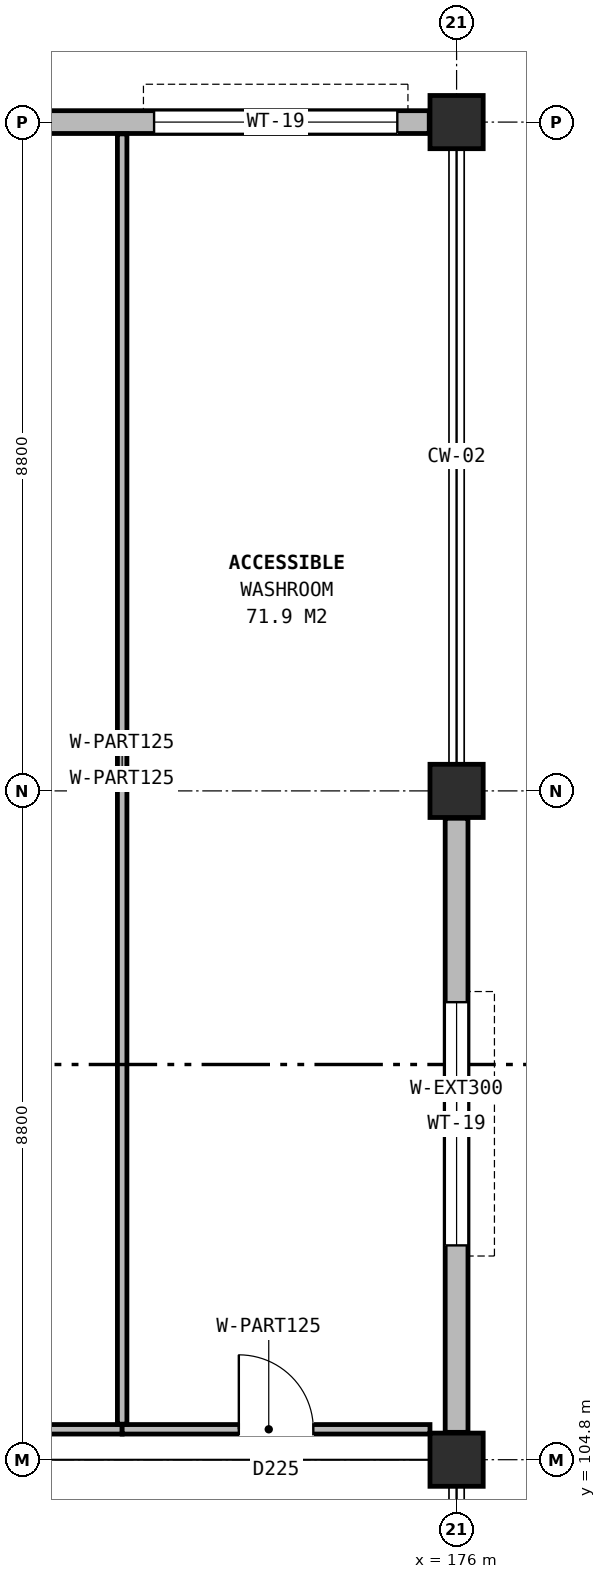
"""IFC4 building model, lengths in metres.
Left out: names, types, materials, properties, quantities, classifications, styles, units other than length and angle.
Written with IfcOpenShell. Run it as: python <this file> out.ifc"""

import sys

from ifc_helpers import new_model, si_unit, direction, frame, frame_2d, origin, origin_2d, place, context, subcontext, project, spatial, rectangle, extrude, element, fill, save


model = new_model("IFC4")
c1 = context("Model", 3, precision=1e-05, world=origin(), true_north=direction((0.0, 1.0)))
c2 = subcontext(c1, "Body", "Model", "MODEL_VIEW")
j1 = project(units=[si_unit("LENGTHUNIT", "METRE"), si_unit("PLANEANGLEUNIT", "RADIAN")], contexts=[c1])
p1 = place(None, origin())
s1 = spatial("IfcSite", under=j1, at=p1, CompositionType="ELEMENT")
p2 = place(p1, origin())
s2 = spatial("IfcBuilding", under=s1, at=p2, CompositionType="ELEMENT")
p3 = place(p2, frame((0.0, 0.0, 28.8)))
s3 = spatial("IfcBuildingStorey", under=s2, at=p3, CompositionType="ELEMENT", Elevation=28.8)
for number, where, z_axis, x_axis in (
    (1, (176.0, 104.8, 0.0), (0.0, 0.0, 1.0), (1.0, 0.0, 0.0)),
    (2, (176.0, 113.6, 0.0), (0.0, 0.0, 1.0), (1.0, 0.0, 0.0)),
    (3, (176.0, 122.4, 0.0), (0.0, 0.0, 1.0), (1.0, 0.0, 0.0)),
):
    element("IfcColumn", number, at=place(p3, frame(where, z_axis=z_axis, x_axis=x_axis)), inside=s3, PredefinedType="COLUMN", context=c2, shape_type="SweptSolid", body=[
        extrude(rectangle(XDim=0.7, YDim=0.7, at=origin_2d()), origin(), (0.0, 0.0, 1.0), 4.0),
    ])
p4 = place(p3, frame((176.0, 105.16, 0.0), z_axis=(0.0, 0.0, 1.0), x_axis=(0.0, 1.0, 0.0)))
e4 = element("IfcWall", 4, at=p4, inside=s3, PredefinedType="SOLIDWALL", context=c2, shape_type="SweptSolid", body=[
    extrude(rectangle(XDim=8.08, YDim=0.3, at=frame_2d((4.04, 0.0))), origin(), (0.0, 0.0, 1.0), 3.15),
])
p5 = place(p4, frame((2.46, 0.0, 0.9)))
e5 = element("IfcOpeningElement", 5, at=p5, cuts=e4, PredefinedType="OPENING", context=c2, shape_type="SweptSolid", body=[
    extrude(rectangle(XDim=3.2, YDim=2.1, at=frame_2d((1.6, 1.05))), frame((0.0, 0.16, 0.0), z_axis=(0.0, -1.0, 0.0), x_axis=(1.0, 0.0, 0.0)), (0.0, 0.0, 1.0), 0.32),
])
p6 = place(p3, frame((175.64, 122.4, 0.0), z_axis=(0.0, 0.0, 1.0), x_axis=(-1.0, 0.0, 0.0)))
e6 = element("IfcWall", 6, at=p6, inside=s3, PredefinedType="SOLIDWALL", context=c2, shape_type="SweptSolid", body=[
    extrude(rectangle(XDim=7.68, YDim=0.3, at=frame_2d((3.84, 0.0))), origin(), (0.0, 0.0, 1.0), 3.15),
])
p7 = place(p6, frame((0.42, 0.0, 0.9)))
e7 = element("IfcOpeningElement", 7, at=p7, cuts=e6, PredefinedType="OPENING", context=c2, shape_type="SweptSolid", body=[
    extrude(rectangle(XDim=3.2, YDim=2.1, at=frame_2d((1.6, 1.05))), frame((0.0, 0.16, 0.0), z_axis=(0.0, -1.0, 0.0), x_axis=(1.0, 0.0, 0.0)), (0.0, 0.0, 1.0), 0.32),
])
p8 = place(p3, frame((167.355, 105.2, 0.0), z_axis=(0.0, 0.0, 1.0), x_axis=(1.0, 0.0, 0.0)))
e8 = element("IfcWall", 8, at=p8, inside=s3, PredefinedType="PARTITIONING", context=c2, shape_type="SweptSolid", body=[
    extrude(rectangle(XDim=4.245, YDim=0.125, at=frame_2d((2.123, 0.0))), origin(), (0.0, 0.0, 1.0), 3.145),
])
p9 = place(p8, frame((1.633, 0.0, 0.0)))
e9 = element("IfcOpeningElement", 9, at=p9, cuts=e8, PredefinedType="OPENING", context=c2, shape_type="SweptSolid", body=[
    extrude(rectangle(XDim=0.98, YDim=2.1, at=frame_2d((0.49, 1.05))), frame((0.0, 0.073, 0.0), z_axis=(0.0, -1.0, 0.0), x_axis=(1.0, 0.0, 0.0)), (0.0, 0.0, 1.0), 0.145),
])
p10 = place(p3, frame((171.6, 105.2, 0.0), z_axis=(0.0, 0.0, 1.0), x_axis=(1.0, 0.0, 0.0)))
e10 = element("IfcWall", 10, at=p10, inside=s3, PredefinedType="PARTITIONING", context=c2, shape_type="SweptSolid", body=[
    extrude(rectangle(XDim=4.05, YDim=0.125, at=frame_2d((2.025, 0.0))), origin(), (0.0, 0.0, 1.0), 3.145),
])
p11 = place(p10, frame((1.535, 0.0, 0.0)))
e11 = element("IfcOpeningElement", 11, at=p11, cuts=e10, PredefinedType="OPENING", context=c2, shape_type="SweptSolid", body=[
    extrude(rectangle(XDim=0.98, YDim=2.1, at=frame_2d((0.49, 1.05))), frame((0.0, 0.073, 0.0), z_axis=(0.0, -1.0, 0.0), x_axis=(1.0, 0.0, 0.0)), (0.0, 0.0, 1.0), 0.145),
])
p12 = place(p3, frame((171.6, 105.268, 0.0), z_axis=(0.0, 0.0, 1.0), x_axis=(0.0, 1.0, 0.0)))
e12 = element("IfcWall", 12, at=p12, inside=s3, PredefinedType="PARTITIONING", context=c2, shape_type="SweptSolid", body=[
    extrude(rectangle(XDim=16.978, YDim=0.125, at=frame_2d((8.489, 0.0))), origin(), (0.0, 0.0, 1.0), 3.665),
])
p13 = place(p5, origin())
e13 = element("IfcWindow", 13, at=p13, inside=s3, PartitioningType="SINGLE_PANEL", PredefinedType="WINDOW", context=c2, shape_type="SweptSolid", body=[
    extrude(rectangle(XDim=3.2, YDim=2.1, at=frame_2d((1.6, 1.05))), frame((0.0, 0.03, 0.0), z_axis=(0.0, -1.0, 0.0), x_axis=(1.0, 0.0, 0.0)), (0.0, 0.0, 1.0), 0.06),
])
fill(e5, e13)
p14 = place(p7, origin())
e14 = element("IfcWindow", 14, at=p14, inside=s3, PartitioningType="SINGLE_PANEL", PredefinedType="WINDOW", context=c2, shape_type="SweptSolid", body=[
    extrude(rectangle(XDim=3.2, YDim=2.1, at=frame_2d((1.6, 1.05))), frame((0.0, 0.03, 0.0), z_axis=(0.0, -1.0, 0.0), x_axis=(1.0, 0.0, 0.0)), (0.0, 0.0, 1.0), 0.06),
])
fill(e7, e14)
p15 = place(p11, origin())
e15 = element("IfcDoor", 15, at=p15, inside=s3, OperationType="SINGLE_SWING_LEFT", PredefinedType="DOOR", context=c2, shape_type="SweptSolid", body=[
    extrude(rectangle(XDim=0.98, YDim=2.1, at=frame_2d((0.49, 1.05))), frame((0.0, 0.025, 0.0), z_axis=(0.0, -1.0, 0.0), x_axis=(1.0, 0.0, 0.0)), (0.0, 0.0, 1.0), 0.05),
])
fill(e11, e15)
save(model, sys.argv[1])
